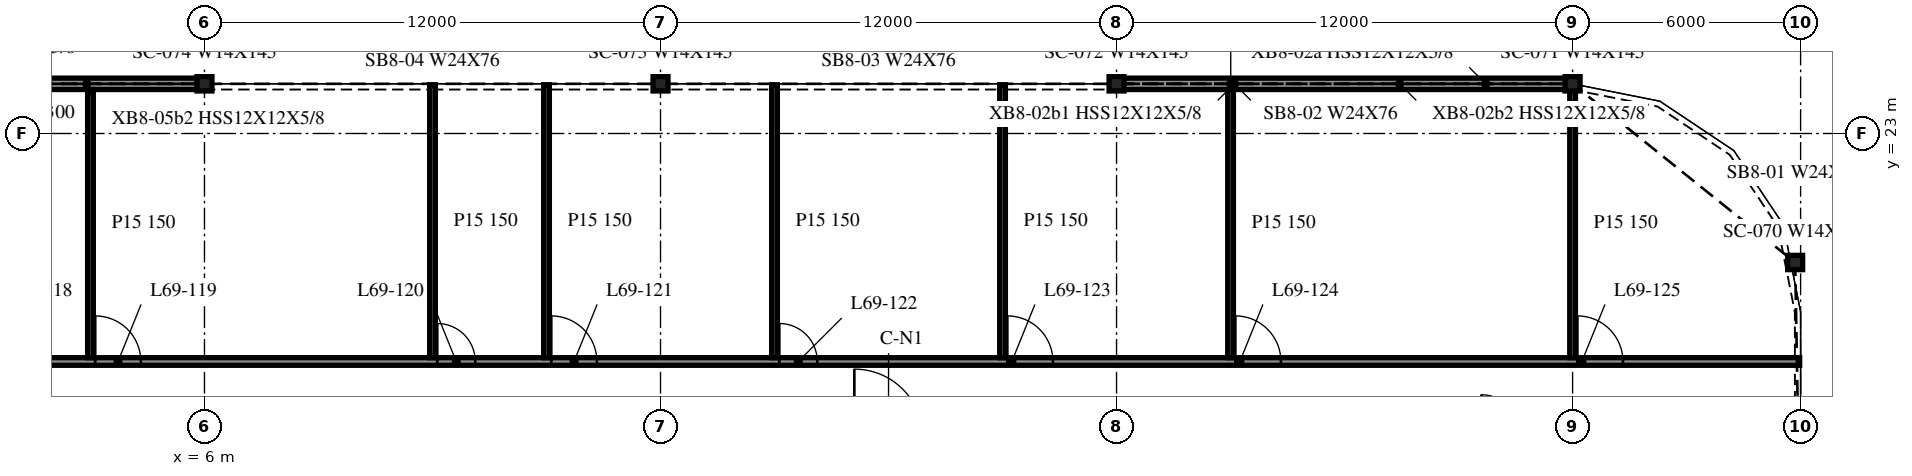
"""IFC4 building model, lengths in metres.
Left out: names, types, materials, properties, quantities, classifications, styles, units other than length and angle.
Written with IfcOpenShell. Run it as: python <this file> out.ifc"""

import sys

from ifc_helpers import new_model, si_unit, direction, frame, frame_2d, origin, origin_2d, place, context, subcontext, project, spatial, rectangle, i_section, extrude, element, fill, save


model = new_model("IFC4")
c1 = context("Model", 3, precision=1e-05, world=origin(), true_north=direction((0.0, 1.0)))
c2 = subcontext(c1, "Body", "Model", "MODEL_VIEW")
j1 = project(units=[si_unit("LENGTHUNIT", "METRE"), si_unit("PLANEANGLEUNIT", "RADIAN")], contexts=[c1])
p1 = place(None, origin())
s1 = spatial("IfcSite", under=j1, at=p1, CompositionType="ELEMENT")
p2 = place(p1, origin())
s2 = spatial("IfcBuilding", under=s1, at=p2, CompositionType="ELEMENT")
p3 = place(p2, frame((0.0, 0.0, 282.3)))
s3 = spatial("IfcBuildingStorey", under=s2, at=p3, CompositionType="ELEMENT", Elevation=282.3)
for number, where, z_axis, x_axis in (
    (1, (47.857, 19.605, -0.34), (0.0, 0.0, 1.0), (1.0, 0.0, 0.0)),
    (2, (42.0, 24.307, -0.34), (0.0, 0.0, 1.0), (1.0, 0.0, 0.0)),
    (3, (30.0, 24.307, -0.34), (0.0, 0.0, 1.0), (1.0, 0.0, 0.0)),
    (4, (18.0, 24.307, -0.34), (0.0, 0.0, 1.0), (1.0, 0.0, 0.0)),
    (5, (6.0, 24.307, -0.34), (0.0, 0.0, 1.0), (1.0, 0.0, 0.0)),
):
    element("IfcColumn", number, at=place(p3, frame(where, z_axis=z_axis, x_axis=x_axis)), inside=s3, PredefinedType="COLUMN", context=c2, shape_type="SweptSolid", body=[
        extrude(i_section(OverallWidth=0.394, OverallDepth=0.376, WebThickness=0.017, FlangeThickness=0.028, at=origin_2d()), origin(), (0.0, 0.0, 1.0), 3.8),
    ])
for number, where, z_axis, x_axis in (
    (6, (41.991, 24.307, 0.0), (0.0, 0.0, 1.0), (-1.0, 0.0, 0.0)),
    (7, (5.991, 24.307, 0.0), (0.0, 0.0, 1.0), (-1.0, 0.0, 0.0)),
):
    element("IfcWall", number, at=place(p3, frame(where, z_axis=z_axis, x_axis=x_axis)), inside=s3, PredefinedType="NOTDEFINED", context=c2, shape_type="SweptSolid", body=[
        extrude(rectangle(XDim=11.983, YDim=0.3, at=frame_2d((5.991, 0.0))), origin(), (0.0, 0.0, 1.0), 3.46),
    ])
p4 = place(p3, frame((-47.975, 17.0, 0.0), z_axis=(0.0, 0.0, 1.0), x_axis=(1.0, 0.0, 0.0)))
e8 = element("IfcWall", 8, at=p4, inside=s3, PredefinedType="PARTITIONING", context=c2, shape_type="SweptSolid", body=[
    extrude(rectangle(XDim=95.95, YDim=0.2, at=frame_2d((47.975, 0.0))), origin(), (0.0, 0.0, 1.0), 3.4),
])
p5 = place(p4, frame((7.3, 0.0, 0.0)))
e9 = element("IfcOpeningElement", 9, at=p5, cuts=e8, PredefinedType="OPENING", context=c2, shape_type="SweptSolid", body=[
    extrude(rectangle(XDim=1.2, YDim=2.1, at=frame_2d((0.6, 1.05))), frame((0.0, 0.11, 0.0), z_axis=(0.0, -1.0, 0.0), x_axis=(1.0, 0.0, 0.0)), (0.0, 0.0, 1.0), 0.22),
])
p6 = place(p4, frame((13.3, 0.0, 0.0)))
e10 = element("IfcOpeningElement", 10, at=p6, cuts=e8, PredefinedType="OPENING", context=c2, shape_type="SweptSolid", body=[
    extrude(rectangle(XDim=1.2, YDim=2.1, at=frame_2d((0.6, 1.05))), frame((0.0, 0.11, 0.0), z_axis=(0.0, -1.0, 0.0), x_axis=(1.0, 0.0, 0.0)), (0.0, 0.0, 1.0), 0.22),
])
p7 = place(p4, frame((19.3, 0.0, 0.0)))
e11 = element("IfcOpeningElement", 11, at=p7, cuts=e8, PredefinedType="OPENING", context=c2, shape_type="SweptSolid", body=[
    extrude(rectangle(XDim=1.2, YDim=2.1, at=frame_2d((0.6, 1.05))), frame((0.0, 0.11, 0.0), z_axis=(0.0, -1.0, 0.0), x_axis=(1.0, 0.0, 0.0)), (0.0, 0.0, 1.0), 0.22),
])
p8 = place(p4, frame((28.5, 0.0, 0.0)))
e12 = element("IfcOpeningElement", 12, at=p8, cuts=e8, PredefinedType="OPENING", context=c2, shape_type="SweptSolid", body=[
    extrude(rectangle(XDim=1.0, YDim=2.1, at=frame_2d((0.5, 1.05))), frame((0.0, 0.11, 0.0), z_axis=(0.0, -1.0, 0.0), x_axis=(1.0, 0.0, 0.0)), (0.0, 0.0, 1.0), 0.22),
])
p9 = place(p4, frame((31.3, 0.0, 0.0)))
e13 = element("IfcOpeningElement", 13, at=p9, cuts=e8, PredefinedType="OPENING", context=c2, shape_type="SweptSolid", body=[
    extrude(rectangle(XDim=1.2, YDim=2.1, at=frame_2d((0.6, 1.05))), frame((0.0, 0.11, 0.0), z_axis=(0.0, -1.0, 0.0), x_axis=(1.0, 0.0, 0.0)), (0.0, 0.0, 1.0), 0.22),
])
p10 = place(p4, frame((37.5, 0.0, 0.0)))
e14 = element("IfcOpeningElement", 14, at=p10, cuts=e8, PredefinedType="OPENING", context=c2, shape_type="SweptSolid", body=[
    extrude(rectangle(XDim=1.0, YDim=2.1, at=frame_2d((0.5, 1.05))), frame((0.0, 0.11, 0.0), z_axis=(0.0, -1.0, 0.0), x_axis=(1.0, 0.0, 0.0)), (0.0, 0.0, 1.0), 0.22),
])
p11 = place(p4, frame((43.3, 0.0, 0.0)))
e15 = element("IfcOpeningElement", 15, at=p11, cuts=e8, PredefinedType="OPENING", context=c2, shape_type="SweptSolid", body=[
    extrude(rectangle(XDim=1.2, YDim=2.1, at=frame_2d((0.6, 1.05))), frame((0.0, 0.11, 0.0), z_axis=(0.0, -1.0, 0.0), x_axis=(1.0, 0.0, 0.0)), (0.0, 0.0, 1.0), 0.22),
])
p12 = place(p4, frame((47.3, 0.0, 0.0)))
e16 = element("IfcOpeningElement", 16, at=p12, cuts=e8, PredefinedType="OPENING", context=c2, shape_type="SweptSolid", body=[
    extrude(rectangle(XDim=1.2, YDim=2.1, at=frame_2d((0.6, 1.05))), frame((0.0, 0.11, 0.0), z_axis=(0.0, -1.0, 0.0), x_axis=(1.0, 0.0, 0.0)), (0.0, 0.0, 1.0), 0.22),
])
p13 = place(p4, frame((51.1, 0.0, 0.0)))
e17 = element("IfcOpeningElement", 17, at=p13, cuts=e8, PredefinedType="OPENING", context=c2, shape_type="SweptSolid", body=[
    extrude(rectangle(XDim=1.2, YDim=2.1, at=frame_2d((0.6, 1.05))), frame((0.0, 0.11, 0.0), z_axis=(0.0, -1.0, 0.0), x_axis=(1.0, 0.0, 0.0)), (0.0, 0.0, 1.0), 0.22),
])
p14 = place(p4, frame((60.1, 0.0, 0.0)))
e18 = element("IfcOpeningElement", 18, at=p14, cuts=e8, PredefinedType="OPENING", context=c2, shape_type="SweptSolid", body=[
    extrude(rectangle(XDim=1.0, YDim=2.1, at=frame_2d((0.5, 1.05))), frame((0.0, 0.11, 0.0), z_axis=(0.0, -1.0, 0.0), x_axis=(1.0, 0.0, 0.0)), (0.0, 0.0, 1.0), 0.22),
])
p15 = place(p4, frame((63.1, 0.0, 0.0)))
e19 = element("IfcOpeningElement", 19, at=p15, cuts=e8, PredefinedType="OPENING", context=c2, shape_type="SweptSolid", body=[
    extrude(rectangle(XDim=1.2, YDim=2.1, at=frame_2d((0.6, 1.05))), frame((0.0, 0.11, 0.0), z_axis=(0.0, -1.0, 0.0), x_axis=(1.0, 0.0, 0.0)), (0.0, 0.0, 1.0), 0.22),
])
p16 = place(p4, frame((69.1, 0.0, 0.0)))
e20 = element("IfcOpeningElement", 20, at=p16, cuts=e8, PredefinedType="OPENING", context=c2, shape_type="SweptSolid", body=[
    extrude(rectangle(XDim=1.0, YDim=2.1, at=frame_2d((0.5, 1.05))), frame((0.0, 0.11, 0.0), z_axis=(0.0, -1.0, 0.0), x_axis=(1.0, 0.0, 0.0)), (0.0, 0.0, 1.0), 0.22),
])
p17 = place(p4, frame((75.1, 0.0, 0.0)))
e21 = element("IfcOpeningElement", 21, at=p17, cuts=e8, PredefinedType="OPENING", context=c2, shape_type="SweptSolid", body=[
    extrude(rectangle(XDim=1.2, YDim=2.1, at=frame_2d((0.6, 1.05))), frame((0.0, 0.11, 0.0), z_axis=(0.0, -1.0, 0.0), x_axis=(1.0, 0.0, 0.0)), (0.0, 0.0, 1.0), 0.22),
])
p18 = place(p4, frame((81.1, 0.0, 0.0)))
e22 = element("IfcOpeningElement", 22, at=p18, cuts=e8, PredefinedType="OPENING", context=c2, shape_type="SweptSolid", body=[
    extrude(rectangle(XDim=1.2, YDim=2.1, at=frame_2d((0.6, 1.05))), frame((0.0, 0.11, 0.0), z_axis=(0.0, -1.0, 0.0), x_axis=(1.0, 0.0, 0.0)), (0.0, 0.0, 1.0), 0.22),
])
p19 = place(p4, frame((90.1, 0.0, 0.0)))
e23 = element("IfcOpeningElement", 23, at=p19, cuts=e8, PredefinedType="OPENING", context=c2, shape_type="SweptSolid", body=[
    extrude(rectangle(XDim=1.2, YDim=2.1, at=frame_2d((0.6, 1.05))), frame((0.0, 0.11, 0.0), z_axis=(0.0, -1.0, 0.0), x_axis=(1.0, 0.0, 0.0)), (0.0, 0.0, 1.0), 0.22),
])
p20 = place(p3, frame((3.0, 17.1, 0.0), z_axis=(0.0, 0.0, 1.0), x_axis=(0.0, 1.0, 0.0)))
e24 = element("IfcWall", 24, at=p20, inside=s3, PredefinedType="PARTITIONING", context=c2, shape_type="SweptSolid", body=[
    extrude(rectangle(XDim=7.057, YDim=0.15, at=frame_2d((3.528, 0.0))), origin(), (0.0, 0.0, 1.0), 3.4),
])
for number, where, z_axis, x_axis in (
    (25, (12.0, 17.1, 0.0), (0.0, 0.0, 1.0), (0.0, 1.0, 0.0)),
    (26, (15.0, 17.1, 0.0), (0.0, 0.0, 1.0), (0.0, 1.0, 0.0)),
    (27, (21.0, 17.1, 0.0), (0.0, 0.0, 1.0), (0.0, 1.0, 0.0)),
    (28, (27.0, 17.1, 0.0), (0.0, 0.0, 1.0), (0.0, 1.0, 0.0)),
):
    element("IfcWall", number, at=place(p3, frame(where, z_axis=z_axis, x_axis=x_axis)), inside=s3, PredefinedType="PARTITIONING", context=c2, shape_type="SweptSolid", body=[
        extrude(rectangle(XDim=7.182, YDim=0.15, at=frame_2d((3.591, 0.0))), origin(), (0.0, 0.0, 1.0), 3.4),
    ])
p21 = place(p3, frame((33.0, 17.1, 0.0), z_axis=(0.0, 0.0, 1.0), x_axis=(0.0, 1.0, 0.0)))
e29 = element("IfcWall", 29, at=p21, inside=s3, PredefinedType="PARTITIONING", context=c2, shape_type="SweptSolid", body=[
    extrude(rectangle(XDim=7.057, YDim=0.15, at=frame_2d((3.528, 0.0))), origin(), (0.0, 0.0, 1.0), 3.4),
])
p22 = place(p3, frame((42.0, 17.1, 0.0), z_axis=(0.0, 0.0, 1.0), x_axis=(0.0, 1.0, 0.0)))
e30 = element("IfcWall", 30, at=p22, inside=s3, PredefinedType="PARTITIONING", context=c2, shape_type="SweptSolid", body=[
    extrude(rectangle(XDim=7.054, YDim=0.15, at=frame_2d((3.527, 0.0))), origin(), (0.0, 0.0, 1.0), 3.4),
])
p23 = place(p13, origin())
e31 = element("IfcDoor", 31, at=p23, inside=s3, OperationType="SINGLE_SWING_RIGHT", PredefinedType="DOOR", context=c2, shape_type="SweptSolid", body=[
    extrude(rectangle(XDim=1.2, YDim=2.1, at=frame_2d((0.6, 1.05))), frame((0.0, 0.025, 0.0), z_axis=(0.0, -1.0, 0.0), x_axis=(1.0, 0.0, 0.0)), (0.0, 0.0, 1.0), 0.05),
])
fill(e17, e31)
p24 = place(p14, origin())
e32 = element("IfcDoor", 32, at=p24, inside=s3, OperationType="SINGLE_SWING_RIGHT", PredefinedType="DOOR", context=c2, shape_type="SweptSolid", body=[
    extrude(rectangle(XDim=1.0, YDim=2.1, at=frame_2d((0.5, 1.05))), frame((0.0, 0.025, 0.0), z_axis=(0.0, -1.0, 0.0), x_axis=(1.0, 0.0, 0.0)), (0.0, 0.0, 1.0), 0.05),
])
fill(e18, e32)
p25 = place(p15, origin())
e33 = element("IfcDoor", 33, at=p25, inside=s3, OperationType="SINGLE_SWING_RIGHT", PredefinedType="DOOR", context=c2, shape_type="SweptSolid", body=[
    extrude(rectangle(XDim=1.2, YDim=2.1, at=frame_2d((0.6, 1.05))), frame((0.0, 0.025, 0.0), z_axis=(0.0, -1.0, 0.0), x_axis=(1.0, 0.0, 0.0)), (0.0, 0.0, 1.0), 0.05),
])
fill(e19, e33)
p26 = place(p16, origin())
e34 = element("IfcDoor", 34, at=p26, inside=s3, OperationType="SINGLE_SWING_RIGHT", PredefinedType="DOOR", context=c2, shape_type="SweptSolid", body=[
    extrude(rectangle(XDim=1.0, YDim=2.1, at=frame_2d((0.5, 1.05))), frame((0.0, 0.025, 0.0), z_axis=(0.0, -1.0, 0.0), x_axis=(1.0, 0.0, 0.0)), (0.0, 0.0, 1.0), 0.05),
])
fill(e20, e34)
p27 = place(p17, origin())
e35 = element("IfcDoor", 35, at=p27, inside=s3, OperationType="SINGLE_SWING_RIGHT", PredefinedType="DOOR", context=c2, shape_type="SweptSolid", body=[
    extrude(rectangle(XDim=1.2, YDim=2.1, at=frame_2d((0.6, 1.05))), frame((0.0, 0.025, 0.0), z_axis=(0.0, -1.0, 0.0), x_axis=(1.0, 0.0, 0.0)), (0.0, 0.0, 1.0), 0.05),
])
fill(e21, e35)
p28 = place(p18, origin())
e36 = element("IfcDoor", 36, at=p28, inside=s3, OperationType="SINGLE_SWING_RIGHT", PredefinedType="DOOR", context=c2, shape_type="SweptSolid", body=[
    extrude(rectangle(XDim=1.2, YDim=2.1, at=frame_2d((0.6, 1.05))), frame((0.0, 0.025, 0.0), z_axis=(0.0, -1.0, 0.0), x_axis=(1.0, 0.0, 0.0)), (0.0, 0.0, 1.0), 0.05),
])
fill(e22, e36)
p29 = place(p19, origin())
e37 = element("IfcDoor", 37, at=p29, inside=s3, OperationType="SINGLE_SWING_RIGHT", PredefinedType="DOOR", context=c2, shape_type="SweptSolid", body=[
    extrude(rectangle(XDim=1.2, YDim=2.1, at=frame_2d((0.6, 1.05))), frame((0.0, 0.025, 0.0), z_axis=(0.0, -1.0, 0.0), x_axis=(1.0, 0.0, 0.0)), (0.0, 0.0, 1.0), 0.05),
])
fill(e23, e37)
save(model, sys.argv[1])
